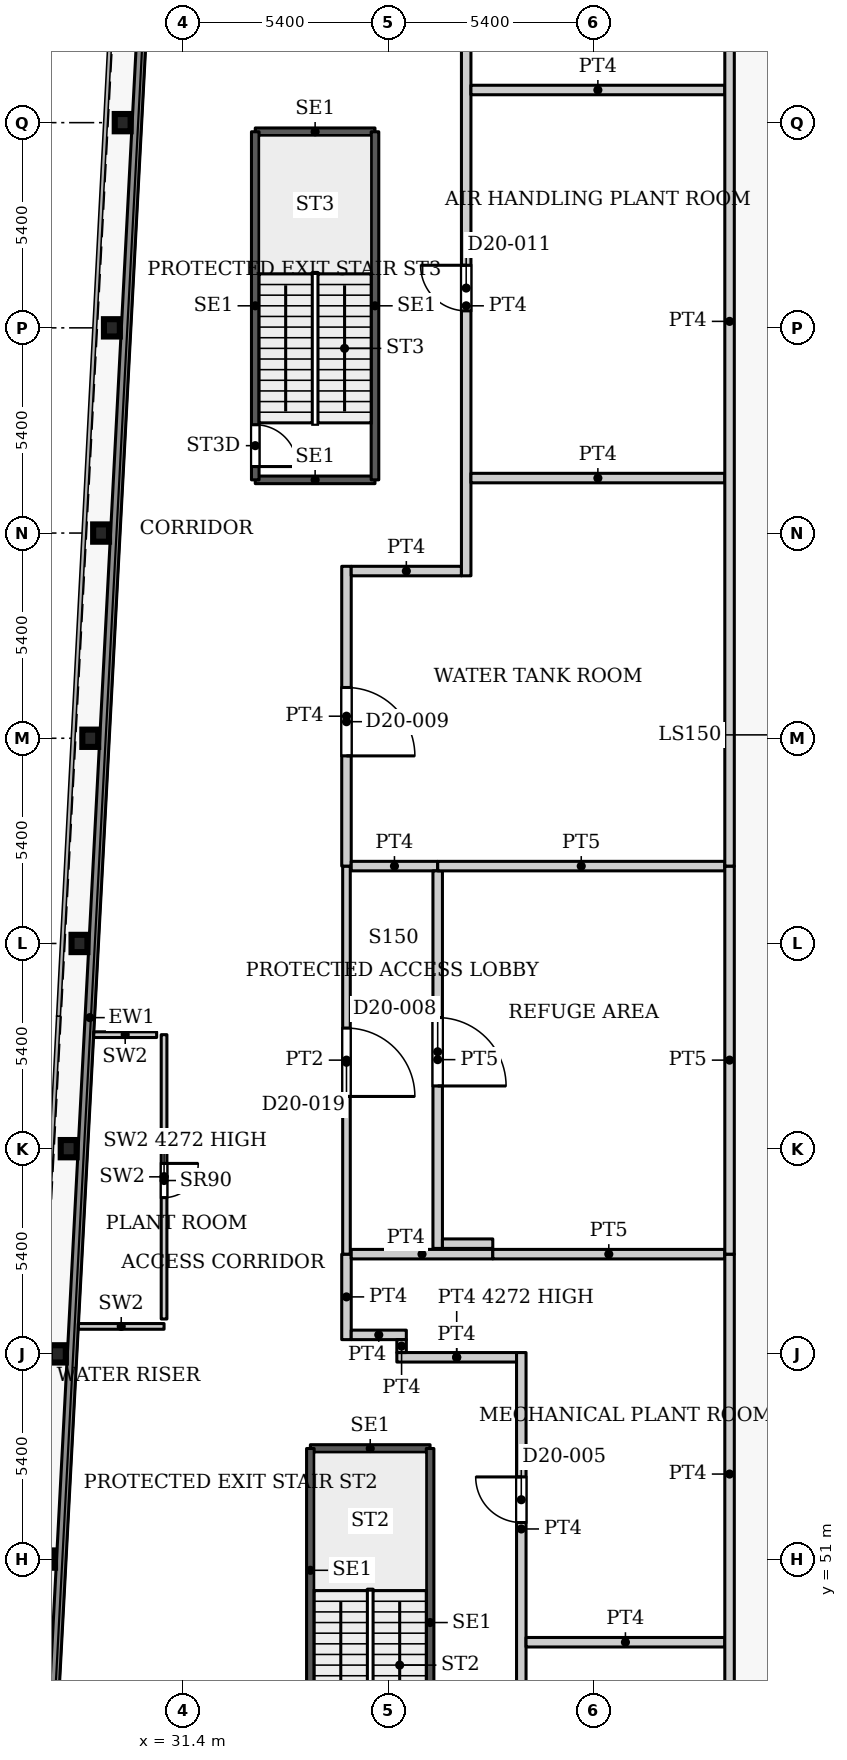
"""IFC4 building model, lengths in metres.
Left out: names, types, materials, properties, quantities, classifications, styles, units other than length and angle.
Written with IfcOpenShell. Run it as: python <this file> out.ifc"""

import sys

from ifc_helpers import new_model, si_unit, direction, frame, frame_2d, origin, origin_2d, place, context, subcontext, project, spatial, rectangle, i_section, extrude, source, transform, mapped, element, fill, save


model = new_model("IFC4")
c1 = context("Model", 3, precision=1e-05, world=origin(), true_north=direction((0.0, 1.0)))
c2 = subcontext(c1, "Body", "Model", "MODEL_VIEW")
j1 = project(units=[si_unit("LENGTHUNIT", "METRE"), si_unit("PLANEANGLEUNIT", "RADIAN")], contexts=[c1])
p1 = place(None, origin())
s1 = spatial("IfcSite", under=j1, at=p1, CompositionType="ELEMENT")
p2 = place(p1, origin())
s2 = spatial("IfcBuilding", under=s1, at=p2, CompositionType="ELEMENT")
p3 = place(p2, frame((0.0, 0.0, 89.0)))
s3 = spatial("IfcBuildingStorey", under=s2, at=p3, CompositionType="ELEMENT", Elevation=89.0)
for number, where, z_axis, x_axis in (
    (1, (27.822, 51.0, 0.0), (0.0, 0.0, 1.0), (1.0, 0.0, 0.0)),
    (2, (28.106, 56.4, 0.0), (0.0, 0.0, 1.0), (1.0, 0.0, 0.0)),
    (3, (28.39, 61.8, 0.0), (0.0, 0.0, 1.0), (1.0, 0.0, 0.0)),
    (4, (28.674, 67.2, 0.0), (0.0, 0.0, 1.0), (1.0, 0.0, 0.0)),
    (5, (28.958, 72.6, 0.0), (0.0, 0.0, 1.0), (1.0, 0.0, 0.0)),
    (6, (29.243, 78.0, 0.0), (0.0, 0.0, 1.0), (1.0, 0.0, 0.0)),
    (7, (29.527, 83.4, 0.0), (0.0, 0.0, 1.0), (1.0, 0.0, 0.0)),
    (8, (29.811, 88.8, 0.0), (0.0, 0.0, 1.0), (1.0, 0.0, 0.0)),
):
    element("IfcColumn", number, at=place(p3, frame(where, z_axis=z_axis, x_axis=x_axis)), inside=s3, PredefinedType="COLUMN", context=c2, shape_type="SweptSolid", body=[
        extrude(i_section(OverallWidth=0.418, OverallDepth=0.455, WebThickness=0.042, FlangeThickness=0.068, FilletRadius=0.014, at=origin_2d()), origin(), (0.0, 0.0, 1.0), 5.1),
    ])
p4 = place(p3, frame((27.195, 31.969, 0.0), z_axis=(0.0, 0.0, 1.0), x_axis=(0.052556141556, 0.99861797099, 0.0)))
e9 = element("IfcWall", 9, at=p4, inside=s3, PredefinedType="SOLIDWALL", context=c2, shape_type="SweptSolid", body=[
    extrude(rectangle(XDim=66.651, YDim=0.25, at=frame_2d((33.326, 0.0))), origin(), (0.0, 0.0, 1.0), 4.95),
])
p5 = place(p3, frame((34.75, 53.91, 0.0), z_axis=(0.0, 0.0, 1.0), x_axis=(1.0, 0.0, 0.0)))
e10 = element("IfcWall", 10, at=p5, inside=s3, PredefinedType="SHEAR", context=c2, shape_type="SweptSolid", body=[
    extrude(rectangle(XDim=3.15, YDim=0.2, at=frame_2d((1.575, 0.0))), origin(), (0.0, 0.0, 1.0), 5.1),
])
p6 = place(p3, frame((34.75, 47.5, 0.0), z_axis=(0.0, 0.0, 1.0), x_axis=(0.0, 1.0, 0.0)))
e11 = element("IfcWall", 11, at=p6, inside=s3, PredefinedType="SHEAR", context=c2, shape_type="SweptSolid", body=[
    extrude(rectangle(XDim=6.41, YDim=0.2, at=frame_2d((3.205, 0.0))), origin(), (0.0, 0.0, 1.0), 5.1),
])
p7 = place(p3, frame((37.9, 44.75, 0.0), z_axis=(0.0, 0.0, 1.0), x_axis=(0.0, 1.0, 0.0)))
e12 = element("IfcWall", 12, at=p7, inside=s3, PredefinedType="SHEAR", context=c2, shape_type="SweptSolid", body=[
    extrude(rectangle(XDim=9.16, YDim=0.2, at=frame_2d((4.58, 0.0))), origin(), (0.0, 0.0, 1.0), 5.1),
])
for number, where, z_axis, x_axis in (
    (13, (33.3, 79.4, 0.0), (0.0, 0.0, 1.0), (1.0, 0.0, 0.0)),
    (14, (33.3, 88.56, 0.0), (0.0, 0.0, 1.0), (1.0, 0.0, 0.0)),
):
    element("IfcWall", number, at=place(p3, frame(where, z_axis=z_axis, x_axis=x_axis)), inside=s3, PredefinedType="SHEAR", context=c2, shape_type="SweptSolid", body=[
        extrude(rectangle(XDim=3.15, YDim=0.2, at=frame_2d((1.575, 0.0))), origin(), (0.0, 0.0, 1.0), 5.1),
    ])
p8 = place(p3, frame((33.3, 79.4, 0.0), z_axis=(0.0, 0.0, 1.0), x_axis=(0.0, 1.0, 0.0)))
e15 = element("IfcWall", 15, at=p8, inside=s3, PredefinedType="SHEAR", context=c2, shape_type="SweptSolid", body=[
    extrude(rectangle(XDim=9.16, YDim=0.2, at=frame_2d((4.58, 0.0))), origin(), (0.0, 0.0, 1.0), 5.1),
])
p9 = place(p8, frame((0.35, 0.0, 0.0)))
e16 = element("IfcOpeningElement", 16, at=p9, cuts=e15, PredefinedType="OPENING", context=c2, shape_type="SweptSolid", body=[
    extrude(rectangle(XDim=1.1, YDim=2.2, at=frame_2d((0.55, 1.1))), frame((0.0, 0.11, 0.0), z_axis=(0.0, -1.0, 0.0), x_axis=(1.0, 0.0, 0.0)), (0.0, 0.0, 1.0), 0.22),
])
p10 = place(p3, frame((36.45, 79.4, 0.0), z_axis=(0.0, 0.0, 1.0), x_axis=(0.0, 1.0, 0.0)))
e17 = element("IfcWall", 17, at=p10, inside=s3, PredefinedType="SHEAR", context=c2, shape_type="SweptSolid", body=[
    extrude(rectangle(XDim=9.16, YDim=0.2, at=frame_2d((4.58, 0.0))), origin(), (0.0, 0.0, 1.0), 5.1),
])
p11 = place(p3, frame((28.646, 57.123, 0.0), z_axis=(0.0, 0.0, 1.0), x_axis=(1.0, 0.0, 0.0)))
e18 = element("IfcWall", 18, at=p11, inside=s3, PredefinedType="PARTITIONING", context=c2, shape_type="SweptSolid", body=[
    extrude(rectangle(XDim=2.254, YDim=0.15, at=frame_2d((1.127, 0.0))), origin(), (0.0, 0.0, 1.0), 5.1),
])
p12 = place(p3, frame((30.9, 57.318, 0.0), z_axis=(0.0, 0.0, 1.0), x_axis=(0.0, 1.0, 0.0)))
e19 = element("IfcWall", 19, at=p12, inside=s3, PredefinedType="PARTITIONING", context=c2, shape_type="SweptSolid", body=[
    extrude(rectangle(XDim=7.482, YDim=0.15, at=frame_2d((3.741, 0.0))), origin(), (0.0, 0.0, 1.0), 4.272),
])
p13 = place(p12, frame((3.194, 0.0, 0.0)))
e20 = element("IfcOpeningElement", 20, at=p13, cuts=e19, PredefinedType="OPENING", context=c2, shape_type="SweptSolid", body=[
    extrude(rectangle(XDim=0.9, YDim=2.2, at=frame_2d((0.45, 1.1))), frame((0.0, 0.085, 0.0), z_axis=(0.0, -1.0, 0.0), x_axis=(1.0, 0.0, 0.0)), (0.0, 0.0, 1.0), 0.17),
])
p14 = place(p3, frame((29.05, 64.8, 0.0), z_axis=(0.0, 0.0, 1.0), x_axis=(1.0, 0.0, 0.0)))
e21 = element("IfcWall", 21, at=p14, inside=s3, PredefinedType="PARTITIONING", context=c2, shape_type="SweptSolid", body=[
    extrude(rectangle(XDim=1.655, YDim=0.15, at=frame_2d((0.828, 0.0))), origin(), (0.0, 0.0, 1.0), 5.1),
])
p15 = place(p3, frame((35.7, 56.775, 0.0), z_axis=(0.0, 0.0, 1.0), x_axis=(0.0, 1.0, 0.0)))
e22 = element("IfcWall", 22, at=p15, inside=s3, PredefinedType="PARTITIONING", context=c2, shape_type="SweptSolid", body=[
    extrude(rectangle(XDim=2.249, YDim=0.25, at=frame_2d((1.125, 0.0))), origin(), (0.0, 0.0, 1.0), 4.8),
])
p16 = place(p3, frame((35.7, 59.024, 0.0), z_axis=(0.0, 0.0, 1.0), x_axis=(0.0, 1.0, 0.0)))
e23 = element("IfcWall", 23, at=p16, inside=s3, PredefinedType="PARTITIONING", context=c2, shape_type="SweptSolid", body=[
    extrude(rectangle(XDim=10.212, YDim=0.2, at=frame_2d((5.106, 0.0))), origin(), (0.0, 0.0, 1.0), 4.8),
])
p17 = place(p16, frame((4.15, 0.0, 0.0)))
e24 = element("IfcOpeningElement", 24, at=p17, cuts=e23, PredefinedType="OPENING", context=c2, shape_type="SweptSolid", body=[
    extrude(rectangle(XDim=1.8, YDim=2.1, at=frame_2d((0.9, 1.05))), frame((0.0, 0.11, 0.0), z_axis=(0.0, -1.0, 0.0), x_axis=(1.0, 0.0, 0.0)), (0.0, 0.0, 1.0), 0.22),
])
p18 = place(p3, frame((35.7, 69.236, 0.0), z_axis=(0.0, 0.0, 1.0), x_axis=(0.0, 1.0, 0.0)))
e25 = element("IfcWall", 25, at=p18, inside=s3, PredefinedType="PARTITIONING", context=c2, shape_type="SweptSolid", body=[
    extrude(rectangle(XDim=7.889, YDim=0.25, at=frame_2d((3.944, 0.0))), origin(), (0.0, 0.0, 1.0), 4.8),
])
p19 = place(p18, frame((2.9, 0.0, 0.0)))
e26 = element("IfcOpeningElement", 26, at=p19, cuts=e25, PredefinedType="OPENING", context=c2, shape_type="SweptSolid", body=[
    extrude(rectangle(XDim=1.8, YDim=2.1, at=frame_2d((0.9, 1.05))), frame((0.0, 0.135, 0.0), z_axis=(0.0, -1.0, 0.0), x_axis=(1.0, 0.0, 0.0)), (0.0, 0.0, 1.0), 0.27),
])
p20 = place(p3, frame((35.825, 56.9, 0.0), z_axis=(0.0, 0.0, 1.0), x_axis=(1.0, 0.0, 0.0)))
e27 = element("IfcWall", 27, at=p20, inside=s3, PredefinedType="PARTITIONING", context=c2, shape_type="SweptSolid", body=[
    extrude(rectangle(XDim=1.45, YDim=0.25, at=frame_2d((0.725, 0.0))), origin(), (0.0, 0.0, 1.0), 4.8),
])
p21 = place(p3, frame((35.825, 59.024, 0.0), z_axis=(0.0, 0.0, 1.0), x_axis=(1.0, 0.0, 0.0)))
e28 = element("IfcWall", 28, at=p21, inside=s3, PredefinedType="PARTITIONING", context=c2, shape_type="SweptSolid", body=[
    extrude(rectangle(XDim=3.725, YDim=0.25, at=frame_2d((1.863, 0.0))), origin(), (0.0, 0.0, 1.0), 4.8),
])
p22 = place(p3, frame((35.825, 69.236, 0.0), z_axis=(0.0, 0.0, 1.0), x_axis=(1.0, 0.0, 0.0)))
e29 = element("IfcWall", 29, at=p22, inside=s3, PredefinedType="PARTITIONING", context=c2, shape_type="SweptSolid", body=[
    extrude(rectangle(XDim=2.275, YDim=0.25, at=frame_2d((1.138, 0.0))), origin(), (0.0, 0.0, 1.0), 4.8),
])
p23 = place(p3, frame((35.825, 77.0, 0.0), z_axis=(0.0, 0.0, 1.0), x_axis=(1.0, 0.0, 0.0)))
e30 = element("IfcWall", 30, at=p23, inside=s3, PredefinedType="PARTITIONING", context=c2, shape_type="SweptSolid", body=[
    extrude(rectangle(XDim=2.9, YDim=0.25, at=frame_2d((1.45, 0.0))), origin(), (0.0, 0.0, 1.0), 4.8),
])
p24 = place(p3, frame((37.025, 56.31, 0.0), z_axis=(0.0, 0.0, 1.0), x_axis=(1.0, 0.0, 0.0)))
e31 = element("IfcWall", 31, at=p24, inside=s3, PredefinedType="PARTITIONING", context=c2, shape_type="SweptSolid", body=[
    extrude(rectangle(XDim=3.15, YDim=0.25, at=frame_2d((1.575, 0.0))), origin(), (0.0, 0.0, 1.0), 4.272),
])
p25 = place(p3, frame((37.15, 56.435, 0.0), z_axis=(0.0, 0.0, 1.0), x_axis=(0.0, 1.0, 0.0)))
e32 = element("IfcWall", 32, at=p25, inside=s3, PredefinedType="PARTITIONING", context=c2, shape_type="SweptSolid", body=[
    extrude(rectangle(XDim=0.34, YDim=0.25, at=frame_2d((0.17, 0.0))), origin(), (0.0, 0.0, 1.0), 4.8),
])
p26 = place(p3, frame((38.1, 59.175, 0.0), z_axis=(0.0, 0.0, 1.0), x_axis=(0.0, 1.0, 0.0)))
e33 = element("IfcWall", 33, at=p26, inside=s3, PredefinedType="PARTITIONING", context=c2, shape_type="SweptSolid", body=[
    extrude(rectangle(XDim=9.936, YDim=0.25, at=frame_2d((4.968, 0.0))), origin(), (0.0, 0.0, 1.0), 4.8),
])
p27 = place(p26, frame((4.275, 0.0, 0.0)))
e34 = element("IfcOpeningElement", 34, at=p27, cuts=e33, PredefinedType="OPENING", context=c2, shape_type="SweptSolid", body=[
    extrude(rectangle(XDim=1.8, YDim=2.1, at=frame_2d((0.9, 1.05))), frame((0.0, 0.135, 0.0), z_axis=(0.0, -1.0, 0.0), x_axis=(1.0, 0.0, 0.0)), (0.0, 0.0, 1.0), 0.27),
])
p28 = place(p3, frame((38.1, 69.236, 0.0), z_axis=(0.0, 0.0, 1.0), x_axis=(1.0, 0.0, 0.0)))
e35 = element("IfcWall", 35, at=p28, inside=s3, PredefinedType="PARTITIONING", context=c2, shape_type="SweptSolid", body=[
    extrude(rectangle(XDim=7.555, YDim=0.25, at=frame_2d((3.777, 0.0))), origin(), (0.0, 0.0, 1.0), 4.8),
])
p29 = place(p3, frame((38.225, 59.3, 0.0), z_axis=(0.0, 0.0, 1.0), x_axis=(1.0, 0.0, 0.0)))
e36 = element("IfcWall", 36, at=p29, inside=s3, PredefinedType="PARTITIONING", context=c2, shape_type="SweptSolid", body=[
    extrude(rectangle(XDim=1.325, YDim=0.25, at=frame_2d((0.663, 0.0))), origin(), (0.0, 0.0, 1.0), 4.8),
])
p30 = place(p3, frame((38.85, 76.875, 0.0), z_axis=(0.0, 0.0, 1.0), x_axis=(0.0, 1.0, 0.0)))
e37 = element("IfcWall", 37, at=p30, inside=s3, PredefinedType="PARTITIONING", context=c2, shape_type="SweptSolid", body=[
    extrude(rectangle(XDim=14.21, YDim=0.25, at=frame_2d((7.105, 0.0))), origin(), (0.0, 0.0, 1.0), 4.8),
])
p31 = place(p30, frame((6.972, 0.0, 0.0)))
e38 = element("IfcOpeningElement", 38, at=p31, cuts=e37, PredefinedType="OPENING", context=c2, shape_type="SweptSolid", body=[
    extrude(rectangle(XDim=1.2, YDim=2.1, at=frame_2d((0.6, 1.05))), frame((0.0, 0.135, 0.0), z_axis=(0.0, -1.0, 0.0), x_axis=(1.0, 0.0, 0.0)), (0.0, 0.0, 1.0), 0.27),
])
for number, where, z_axis, x_axis in (
    (39, (38.975, 79.447, 0.0), (0.0, 0.0, 1.0), (1.0, 0.0, 0.0)),
    (40, (38.975, 89.659, 0.0), (0.0, 0.0, 1.0), (1.0, 0.0, 0.0)),
):
    element("IfcWall", number, at=place(p3, frame(where, z_axis=z_axis, x_axis=x_axis)), inside=s3, PredefinedType="PARTITIONING", context=c2, shape_type="SweptSolid", body=[
        extrude(rectangle(XDim=6.68, YDim=0.25, at=frame_2d((3.34, 0.0))), origin(), (0.0, 0.0, 1.0), 4.8),
    ])
p32 = place(p3, frame((39.55, 59.024, 0.0), z_axis=(0.0, 0.0, 1.0), x_axis=(1.0, 0.0, 0.0)))
e41 = element("IfcWall", 41, at=p32, inside=s3, PredefinedType="PARTITIONING", context=c2, shape_type="SweptSolid", body=[
    extrude(rectangle(XDim=6.105, YDim=0.25, at=frame_2d((3.052, 0.0))), origin(), (0.0, 0.0, 1.0), 4.8),
])
p33 = place(p3, frame((40.3, 47.15, 0.0), z_axis=(0.0, 0.0, 1.0), x_axis=(0.0, 1.0, 0.0)))
e42 = element("IfcWall", 42, at=p33, inside=s3, PredefinedType="PARTITIONING", context=c2, shape_type="SweptSolid", body=[
    extrude(rectangle(XDim=9.285, YDim=0.25, at=frame_2d((4.643, 0.0))), origin(), (0.0, 0.0, 1.0), 4.8),
])
p34 = place(p33, frame((4.812, 0.0, 0.0)))
e43 = element("IfcOpeningElement", 43, at=p34, cuts=e42, PredefinedType="OPENING", context=c2, shape_type="SweptSolid", body=[
    extrude(rectangle(XDim=1.2, YDim=2.1, at=frame_2d((0.6, 1.05))), frame((0.0, 0.135, 0.0), z_axis=(0.0, -1.0, 0.0), x_axis=(1.0, 0.0, 0.0)), (0.0, 0.0, 1.0), 0.27),
])
p35 = place(p3, frame((40.425, 48.812, 0.0), z_axis=(0.0, 0.0, 1.0), x_axis=(1.0, 0.0, 0.0)))
e44 = element("IfcWall", 44, at=p35, inside=s3, PredefinedType="PARTITIONING", context=c2, shape_type="SweptSolid", body=[
    extrude(rectangle(XDim=5.23, YDim=0.25, at=frame_2d((2.615, 0.0))), origin(), (0.0, 0.0, 1.0), 4.8),
])
p36 = place(p3, frame((45.78, 47.451, 0.0), z_axis=(0.0, 0.0, 1.0), x_axis=(0.0, 1.0, 0.0)))
e45 = element("IfcWall", 45, at=p36, inside=s3, PredefinedType="PARTITIONING", context=c2, shape_type="SweptSolid", body=[
    extrude(rectangle(XDim=11.573, YDim=0.25, at=frame_2d((5.787, 0.0))), origin(), (0.0, 0.0, 1.0), 4.8),
])
p37 = place(p3, frame((45.78, 59.024, 0.0), z_axis=(0.0, 0.0, 1.0), x_axis=(0.0, 1.0, 0.0)))
e46 = element("IfcWall", 46, at=p37, inside=s3, PredefinedType="PARTITIONING", context=c2, shape_type="SweptSolid", body=[
    extrude(rectangle(XDim=10.212, YDim=0.25, at=frame_2d((5.106, 0.0))), origin(), (0.0, 0.0, 1.0), 4.8),
])
p38 = place(p3, frame((45.78, 69.236, 0.0), z_axis=(0.0, 0.0, 1.0), x_axis=(0.0, 1.0, 0.0)))
e47 = element("IfcWall", 47, at=p38, inside=s3, PredefinedType="PARTITIONING", context=c2, shape_type="SweptSolid", body=[
    extrude(rectangle(XDim=28.669, YDim=0.25, at=frame_2d((14.334, 0.0))), origin(), (0.0, 0.0, 1.0), 4.8),
])
m1 = source(origin(), c2, "Body", "SweptSolid", [
    extrude(rectangle(XDim=0.9, YDim=2.2, at=frame_2d((0.45, 1.1))), frame((0.0, 0.025, 0.0), z_axis=(0.0, -1.0, 0.0), x_axis=(1.0, 0.0, 0.0)), (0.0, 0.0, 1.0), 0.05),
])
p39 = place(p13, origin())
e48 = element("IfcDoor", 48, at=p39, inside=s3, OperationType="SINGLE_SWING_RIGHT", PredefinedType="DOOR", context=c2, shape_type="MappedRepresentation", body=[
    mapped(m1, transform((0.0, 0.0, 0.0), x_axis=(1.0, 0.0, 0.0), y_axis=(0.0, 1.0, 0.0), z_axis=(0.0, 0.0, 1.0), scale=1.0)),
])
fill(e20, e48)
m2 = source(origin(), c2, "Body", "SweptSolid", [
    extrude(rectangle(XDim=1.1, YDim=2.2, at=frame_2d((0.55, 1.1))), frame((0.0, 0.025, 0.0), z_axis=(0.0, -1.0, 0.0), x_axis=(1.0, 0.0, 0.0)), (0.0, 0.0, 1.0), 0.05),
])
p40 = place(p9, origin())
e49 = element("IfcDoor", 49, at=p40, inside=s3, OperationType="SINGLE_SWING_RIGHT", PredefinedType="DOOR", context=c2, shape_type="MappedRepresentation", body=[
    mapped(m2, transform((0.0, 0.0, 0.0), x_axis=(1.0, 0.0, 0.0), y_axis=(0.0, 1.0, 0.0), z_axis=(0.0, 0.0, 1.0), scale=1.0)),
])
fill(e16, e49)
m3 = source(origin(), c2, "Body", "SweptSolid", [
    extrude(rectangle(XDim=1.2, YDim=2.1, at=frame_2d((0.6, 1.05))), frame((0.0, 0.025, 0.0), z_axis=(0.0, -1.0, 0.0), x_axis=(1.0, 0.0, 0.0)), (0.0, 0.0, 1.0), 0.05),
])
p41 = place(p34, origin())
e50 = element("IfcDoor", 50, at=p41, inside=s3, OperationType="SINGLE_SWING_LEFT", PredefinedType="DOOR", context=c2, shape_type="MappedRepresentation", body=[
    mapped(m3, transform((0.0, 0.0, 0.0), x_axis=(1.0, 0.0, 0.0), y_axis=(0.0, 1.0, 0.0), z_axis=(0.0, 0.0, 1.0), scale=1.0)),
])
fill(e43, e50)
m4 = source(origin(), c2, "Body", "SweptSolid", [
    extrude(rectangle(XDim=1.8, YDim=2.1, at=frame_2d((0.9, 1.05))), frame((0.0, 0.025, 0.0), z_axis=(0.0, -1.0, 0.0), x_axis=(1.0, 0.0, 0.0)), (0.0, 0.0, 1.0), 0.05),
])
p42 = place(p27, origin())
e51 = element("IfcDoor", 51, at=p42, inside=s3, OperationType="DOUBLE_DOOR_SINGLE_SWING", PredefinedType="DOOR", context=c2, shape_type="MappedRepresentation", body=[
    mapped(m4, transform((0.0, 0.0, 0.0), x_axis=(1.0, 0.0, 0.0), y_axis=(0.0, 1.0, 0.0), z_axis=(0.0, 0.0, 1.0), scale=1.0)),
])
fill(e34, e51)
p43 = place(p19, origin())
e52 = element("IfcDoor", 52, at=p43, inside=s3, OperationType="DOUBLE_DOOR_SINGLE_SWING", PredefinedType="DOOR", context=c2, shape_type="MappedRepresentation", body=[
    mapped(m4, transform((0.0, 0.0, 0.0), x_axis=(1.0, 0.0, 0.0), y_axis=(0.0, 1.0, 0.0), z_axis=(0.0, 0.0, 1.0), scale=1.0)),
])
fill(e26, e52)
p44 = place(p31, origin())
e53 = element("IfcDoor", 53, at=p44, inside=s3, OperationType="SINGLE_SWING_LEFT", PredefinedType="DOOR", context=c2, shape_type="MappedRepresentation", body=[
    mapped(m3, transform((0.0, 0.0, 0.0), x_axis=(1.0, 0.0, 0.0), y_axis=(0.0, 1.0, 0.0), z_axis=(0.0, 0.0, 1.0), scale=1.0)),
])
fill(e38, e53)
m5 = source(origin(), c2, "Body", "SweptSolid", [
    extrude(rectangle(XDim=1.8, YDim=2.1, at=frame_2d((0.9, 1.05))), frame((0.0, 0.025, 0.0), z_axis=(0.0, -1.0, 0.0), x_axis=(1.0, 0.0, 0.0)), (0.0, 0.0, 1.0), 0.05),
])
p45 = place(p17, origin())
e54 = element("IfcDoor", 54, at=p45, inside=s3, OperationType="DOUBLE_DOOR_SINGLE_SWING", PredefinedType="DOOR", context=c2, shape_type="MappedRepresentation", body=[
    mapped(m5, transform((0.0, 0.0, 0.0), x_axis=(1.0, 0.0, 0.0), y_axis=(0.0, 1.0, 0.0), z_axis=(0.0, 0.0, 1.0), scale=1.0)),
])
fill(e24, e54)
save(model, sys.argv[1])
